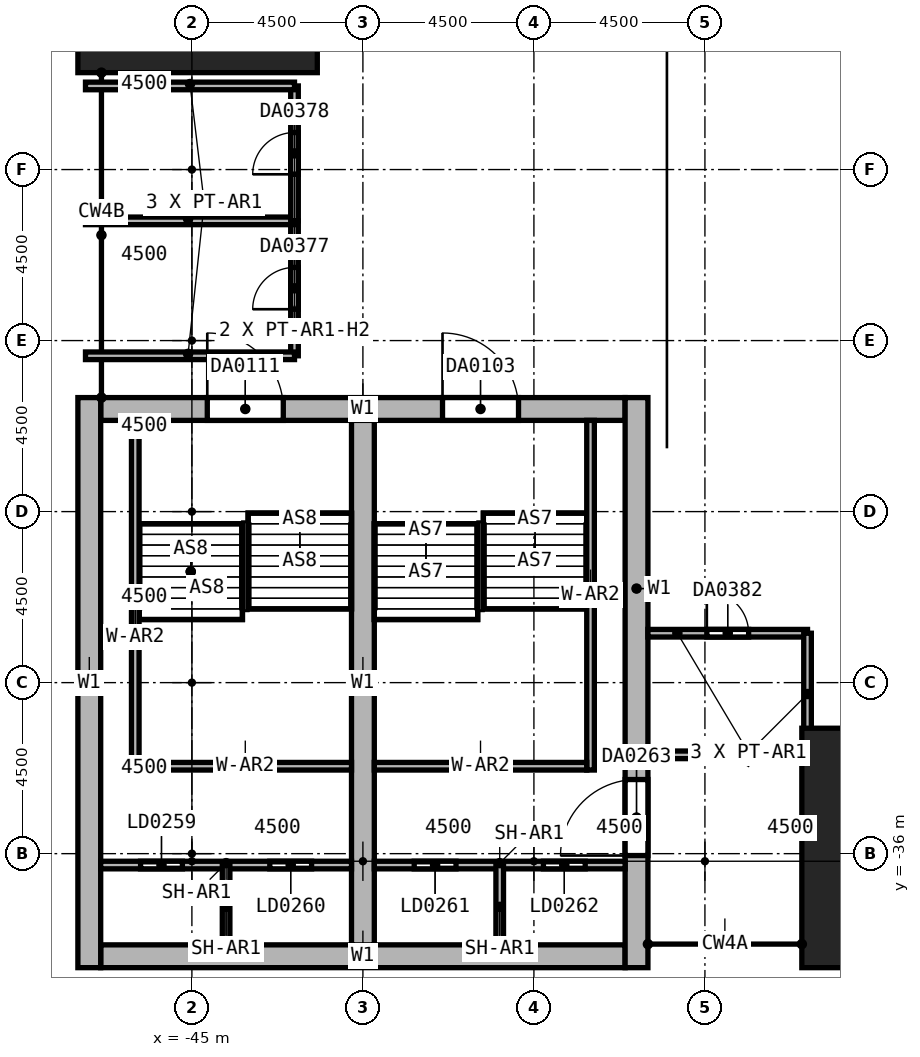
"""IFC4 building model, lengths in metres.
Left out: names, types, materials, properties, quantities, classifications, styles, units other than length and angle.
Written with IfcOpenShell. Run it as: python <this file> out.ifc"""

import sys

from ifc_helpers import new_model, si_unit, direction, frame, frame_2d, origin, origin_2d, place, context, subcontext, project, spatial, rectangle, extrude, element, fill, save


model = new_model("IFC4")
c1 = context("Model", 3, precision=1e-05, world=origin(), true_north=direction((0.0, 1.0)))
c2 = subcontext(c1, "Body", "Model", "MODEL_VIEW")
j1 = project(units=[si_unit("LENGTHUNIT", "METRE"), si_unit("PLANEANGLEUNIT", "RADIAN")], contexts=[c1])
p1 = place(None, origin())
s1 = spatial("IfcSite", under=j1, at=p1, CompositionType="ELEMENT")
p2 = place(p1, origin())
s2 = spatial("IfcBuilding", under=s1, at=p2, CompositionType="ELEMENT")
p3 = place(p2, frame((0.0, 0.0, 19.0)))
s3 = spatial("IfcBuildingStorey", under=s2, at=p3, CompositionType="ELEMENT", Elevation=19.0)
for number, where, z_axis, x_axis in (
    (1, (-27.0, -35.85, 0.0), (0.0, 0.0, 1.0), (1.0, 0.0, 0.0)),
    (2, (-44.85, -13.5, 0.0), (0.0, 0.0, 1.0), (0.0, 1.0, 0.0)),
):
    element("IfcColumn", number, at=place(p3, frame(where, z_axis=z_axis, x_axis=x_axis)), inside=s3, PredefinedType="COLUMN", context=c2, shape_type="SweptSolid", body=[
        extrude(rectangle(XDim=3.9, YDim=6.3, at=origin_2d()), origin(), (0.0, 0.0, 1.0), 6.0),
    ])
p4 = place(p3, frame((-47.4, -24.3, 0.0), z_axis=(0.0, 0.0, 1.0), x_axis=(1.0, 0.0, 0.0)))
e3 = element("IfcWall", 3, at=p4, inside=s3, PredefinedType="SHEAR", context=c2, shape_type="SweptSolid", body=[
    extrude(rectangle(XDim=13.8, YDim=0.6, at=frame_2d((6.9, 0.0))), origin(), (0.0, 0.0, 1.0), 6.0),
])
p5 = place(p4, frame((8.995, 0.0, 0.0)))
e4 = element("IfcOpeningElement", 4, at=p5, cuts=e3, PredefinedType="OPENING", context=c2, shape_type="SweptSolid", body=[
    extrude(rectangle(XDim=2.0, YDim=2.4, at=frame_2d((1.0, 1.2))), frame((0.0, 0.3, 0.0), z_axis=(0.0, -1.0, 0.0), x_axis=(1.0, 0.0, 0.0)), (0.0, 0.0, 1.0), 0.6),
])
p6 = place(p4, frame((2.805, 0.0, 0.0)))
e5 = element("IfcOpeningElement", 5, at=p6, cuts=e3, PredefinedType="OPENING", context=c2, shape_type="SweptSolid", body=[
    extrude(rectangle(XDim=2.0, YDim=2.4, at=frame_2d((1.0, 1.2))), frame((0.0, 0.3, 0.0), z_axis=(0.0, -1.0, 0.0), x_axis=(1.0, 0.0, 0.0)), (0.0, 0.0, 1.0), 0.6),
])
p7 = place(p3, frame((-47.4, -38.7, 0.0), z_axis=(0.0, 0.0, 1.0), x_axis=(1.0, 0.0, 0.0)))
e6 = element("IfcWall", 6, at=p7, inside=s3, PredefinedType="SHEAR", context=c2, shape_type="SweptSolid", body=[
    extrude(rectangle(XDim=13.8, YDim=0.6, at=frame_2d((6.9, 0.0))), origin(), (0.0, 0.0, 1.0), 6.0),
])
p8 = place(p3, frame((-47.7, -39.0, 0.0), z_axis=(0.0, 0.0, 1.0), x_axis=(0.0, 1.0, 0.0)))
e7 = element("IfcWall", 7, at=p8, inside=s3, PredefinedType="SHEAR", context=c2, shape_type="SweptSolid", body=[
    extrude(rectangle(XDim=15.0, YDim=0.6, at=frame_2d((7.5, 0.0))), origin(), (0.0, 0.0, 1.0), 6.0),
])
p9 = place(p3, frame((-33.3, -39.0, 0.0), z_axis=(0.0, 0.0, 1.0), x_axis=(0.0, 1.0, 0.0)))
e8 = element("IfcWall", 8, at=p9, inside=s3, PredefinedType="SHEAR", context=c2, shape_type="SweptSolid", body=[
    extrude(rectangle(XDim=15.0, YDim=0.6, at=frame_2d((7.5, 0.0))), origin(), (0.0, 0.0, 1.0), 6.0),
])
p10 = place(p9, frame((2.95, 0.0, 0.0)))
e9 = element("IfcOpeningElement", 9, at=p10, cuts=e8, PredefinedType="OPENING", context=c2, shape_type="SweptSolid", body=[
    extrude(rectangle(XDim=2.0, YDim=2.4, at=frame_2d((1.0, 1.2))), frame((0.0, 0.3, 0.0), z_axis=(0.0, -1.0, 0.0), x_axis=(1.0, 0.0, 0.0)), (0.0, 0.0, 1.0), 0.6),
])
p11 = place(p3, frame((-40.5, -38.4, 0.0), z_axis=(0.0, 0.0, 1.0), x_axis=(0.0, 1.0, 0.0)))
e10 = element("IfcWall", 10, at=p11, inside=s3, PredefinedType="SHEAR", context=c2, shape_type="SweptSolid", body=[
    extrude(rectangle(XDim=13.8, YDim=0.6, at=frame_2d((6.9, 0.0))), origin(), (0.0, 0.0, 1.0), 6.0),
])
p12 = place(p3, frame((-34.51, -33.8, 0.0), z_axis=(0.0, 0.0, 1.0), x_axis=(0.0, 1.0, 0.0)))
e11 = element("IfcWall", 11, at=p12, inside=s3, PredefinedType="SOLIDWALL", context=c2, shape_type="SweptSolid", body=[
    extrude(rectangle(XDim=9.2, YDim=0.2, at=frame_2d((4.6, 0.0))), origin(), (0.0, 0.0, 1.0), 6.0),
])
p13 = place(p3, frame((-40.2, -33.7, 0.0), z_axis=(0.0, 0.0, 1.0), x_axis=(1.0, 0.0, 0.0)))
e12 = element("IfcWall", 12, at=p13, inside=s3, PredefinedType="SOLIDWALL", context=c2, shape_type="SweptSolid", body=[
    extrude(rectangle(XDim=5.59, YDim=0.2, at=frame_2d((2.795, 0.0))), origin(), (0.0, 0.0, 1.0), 6.0),
])
p14 = place(p3, frame((-46.49, -33.8, 0.0), z_axis=(0.0, 0.0, 1.0), x_axis=(0.0, 1.0, 0.0)))
e13 = element("IfcWall", 13, at=p14, inside=s3, PredefinedType="SOLIDWALL", context=c2, shape_type="SweptSolid", body=[
    extrude(rectangle(XDim=9.2, YDim=0.2, at=frame_2d((4.6, 0.0))), origin(), (0.0, 0.0, 1.0), 6.0),
])
p15 = place(p3, frame((-46.39, -33.7, 0.0), z_axis=(0.0, 0.0, 1.0), x_axis=(1.0, 0.0, 0.0)))
e14 = element("IfcWall", 14, at=p15, inside=s3, PredefinedType="SOLIDWALL", context=c2, shape_type="SweptSolid", body=[
    extrude(rectangle(XDim=5.59, YDim=0.2, at=frame_2d((2.795, 0.0))), origin(), (0.0, 0.0, 1.0), 6.0),
])
p16 = place(p3, frame((-47.4, -36.3, 0.0), z_axis=(0.0, 0.0, 1.0), x_axis=(1.0, 0.0, 0.0)))
e15 = element("IfcWall", 15, at=p16, inside=s3, PredefinedType="SHEAR", context=c2, shape_type="SweptSolid", body=[
    extrude(rectangle(XDim=6.6, YDim=0.2, at=frame_2d((3.3, 0.0))), origin(), (0.0, 0.0, 1.0), 6.0),
])
p17 = place(p16, frame((1.05, 0.0, 0.0)))
e16 = element("IfcOpeningElement", 16, at=p17, cuts=e15, PredefinedType="OPENING", context=c2, shape_type="SweptSolid", body=[
    extrude(rectangle(XDim=1.1, YDim=2.4, at=frame_2d((0.55, 1.2))), frame((0.0, 0.1, 0.0), z_axis=(0.0, -1.0, 0.0), x_axis=(1.0, 0.0, 0.0)), (0.0, 0.0, 1.0), 0.2),
])
p18 = place(p16, frame((4.45, 0.0, 0.0)))
e17 = element("IfcOpeningElement", 17, at=p18, cuts=e15, PredefinedType="OPENING", context=c2, shape_type="SweptSolid", body=[
    extrude(rectangle(XDim=1.1, YDim=2.4, at=frame_2d((0.55, 1.2))), frame((0.0, 0.1, 0.0), z_axis=(0.0, -1.0, 0.0), x_axis=(1.0, 0.0, 0.0)), (0.0, 0.0, 1.0), 0.2),
])
p19 = place(p3, frame((-40.2, -36.3, 0.0), z_axis=(0.0, 0.0, 1.0), x_axis=(1.0, 0.0, 0.0)))
e18 = element("IfcWall", 18, at=p19, inside=s3, PredefinedType="SHEAR", context=c2, shape_type="SweptSolid", body=[
    extrude(rectangle(XDim=6.6, YDim=0.2, at=frame_2d((3.3, 0.0))), origin(), (0.0, 0.0, 1.0), 6.0),
])
p20 = place(p19, frame((1.05, 0.0, 0.0)))
e19 = element("IfcOpeningElement", 19, at=p20, cuts=e18, PredefinedType="OPENING", context=c2, shape_type="SweptSolid", body=[
    extrude(rectangle(XDim=1.1, YDim=2.4, at=frame_2d((0.55, 1.2))), frame((0.0, 0.1, 0.0), z_axis=(0.0, -1.0, 0.0), x_axis=(1.0, 0.0, 0.0)), (0.0, 0.0, 1.0), 0.2),
])
p21 = place(p19, frame((4.45, 0.0, 0.0)))
e20 = element("IfcOpeningElement", 20, at=p21, cuts=e18, PredefinedType="OPENING", context=c2, shape_type="SweptSolid", body=[
    extrude(rectangle(XDim=1.1, YDim=2.4, at=frame_2d((0.55, 1.2))), frame((0.0, 0.1, 0.0), z_axis=(0.0, -1.0, 0.0), x_axis=(1.0, 0.0, 0.0)), (0.0, 0.0, 1.0), 0.2),
])
for number, where, z_axis, x_axis in (
    (21, (-36.9, -38.4, 0.0), (0.0, 0.0, 1.0), (0.0, 1.0, 0.0)),
    (22, (-44.1, -38.4, 0.0), (0.0, 0.0, 1.0), (0.0, 1.0, 0.0)),
):
    element("IfcWall", number, at=place(p3, frame(where, z_axis=z_axis, x_axis=x_axis)), inside=s3, PredefinedType="SHEAR", context=c2, shape_type="SweptSolid", body=[
        extrude(rectangle(XDim=2.1, YDim=0.2, at=frame_2d((1.05, 0.0))), origin(), (0.0, 0.0, 1.0), 6.0),
    ])
p22 = place(p3, frame((-42.3, -22.9, 0.0), z_axis=(0.0, 0.0, 1.0), x_axis=(0.0, 1.0, 0.0)))
e23 = element("IfcWall", 23, at=p22, inside=s3, PredefinedType="PARTITIONING", context=c2, shape_type="SweptSolid", body=[
    extrude(rectangle(XDim=3.55, YDim=0.2, at=frame_2d((1.775, 0.0))), origin(), (0.0, 0.0, 1.0), 4.5),
])
p23 = place(p22, frame((1.225, 0.0, 0.0)))
e24 = element("IfcOpeningElement", 24, at=p23, cuts=e23, PredefinedType="OPENING", context=c2, shape_type="SweptSolid", body=[
    extrude(rectangle(XDim=1.1, YDim=2.4, at=frame_2d((0.55, 1.2))), frame((0.0, 0.1, 0.0), z_axis=(0.0, -1.0, 0.0), x_axis=(1.0, 0.0, 0.0)), (0.0, 0.0, 1.0), 0.2),
])
for number, where, z_axis, x_axis in (
    (25, (-42.3, -22.9, 0.0), (0.0, 0.0, 1.0), (-1.0, 0.0, 0.0)),
    (26, (-47.8, -19.35, 0.0), (0.0, 0.0, 1.0), (1.0, 0.0, 0.0)),
):
    element("IfcWall", number, at=place(p3, frame(where, z_axis=z_axis, x_axis=x_axis)), inside=s3, PredefinedType="PARTITIONING", context=c2, shape_type="SweptSolid", body=[
        extrude(rectangle(XDim=5.5, YDim=0.2, at=frame_2d((2.75, 0.0))), origin(), (0.0, 0.0, 1.0), 5.7),
    ])
p24 = place(p3, frame((-42.3, -19.35, 0.0), z_axis=(0.0, 0.0, 1.0), x_axis=(0.0, 1.0, 0.0)))
e27 = element("IfcWall", 27, at=p24, inside=s3, PredefinedType="PARTITIONING", context=c2, shape_type="SweptSolid", body=[
    extrude(rectangle(XDim=3.55, YDim=0.2, at=frame_2d((1.775, 0.0))), origin(), (0.0, 0.0, 1.0), 4.5),
])
p25 = place(p24, frame((1.225, 0.0, 0.0)))
e28 = element("IfcOpeningElement", 28, at=p25, cuts=e27, PredefinedType="OPENING", context=c2, shape_type="SweptSolid", body=[
    extrude(rectangle(XDim=1.1, YDim=2.4, at=frame_2d((0.55, 1.2))), frame((0.0, 0.1, 0.0), z_axis=(0.0, -1.0, 0.0), x_axis=(1.0, 0.0, 0.0)), (0.0, 0.0, 1.0), 0.2),
])
p26 = place(p3, frame((-42.3, -15.8, 0.0), z_axis=(0.0, 0.0, 1.0), x_axis=(-1.0, 0.0, 0.0)))
e29 = element("IfcWall", 29, at=p26, inside=s3, PredefinedType="PARTITIONING", context=c2, shape_type="SweptSolid", body=[
    extrude(rectangle(XDim=5.5, YDim=0.2, at=frame_2d((2.75, 0.0))), origin(), (0.0, 0.0, 1.0), 5.7),
])
p27 = place(p3, frame((-33.0, -30.2, 0.0), z_axis=(0.0, 0.0, 1.0), x_axis=(1.0, 0.0, 0.0)))
e30 = element("IfcWall", 30, at=p27, inside=s3, PredefinedType="PARTITIONING", context=c2, shape_type="SweptSolid", body=[
    extrude(rectangle(XDim=4.2, YDim=0.2, at=frame_2d((2.1, 0.0))), origin(), (0.0, 0.0, 1.0), 5.7),
])
p28 = place(p27, frame((1.55, 0.0, 0.0)))
e31 = element("IfcOpeningElement", 31, at=p28, cuts=e30, PredefinedType="OPENING", context=c2, shape_type="SweptSolid", body=[
    extrude(rectangle(XDim=1.1, YDim=2.4, at=frame_2d((0.55, 1.2))), frame((0.0, 0.1, 0.0), z_axis=(0.0, -1.0, 0.0), x_axis=(1.0, 0.0, 0.0)), (0.0, 0.0, 1.0), 0.2),
])
p29 = place(p3, frame((-28.8, -33.4, 0.0), z_axis=(0.0, 0.0, 1.0), x_axis=(0.0, 1.0, 0.0)))
e32 = element("IfcWall", 32, at=p29, inside=s3, PredefinedType="PARTITIONING", context=c2, shape_type="SweptSolid", body=[
    extrude(rectangle(XDim=3.2, YDim=0.2, at=frame_2d((1.6, 0.0))), origin(), (0.0, 0.0, 1.0), 5.7),
])
p30 = place(p3, frame((-33.0, -33.4, 0.0), z_axis=(0.0, 0.0, 1.0), x_axis=(1.0, 0.0, 0.0)))
e33 = element("IfcWall", 33, at=p30, inside=s3, PredefinedType="PARTITIONING", context=c2, shape_type="SweptSolid", body=[
    extrude(rectangle(XDim=4.2, YDim=0.2, at=frame_2d((2.1, 0.0))), origin(), (0.0, 0.0, 1.0), 5.7),
])
p31 = place(p5, frame((2.0, 0.0, 0.0), z_axis=(0.0, 0.0, 1.0), x_axis=(-1.0, 0.0, 0.0)))
e34 = element("IfcDoor", 34, at=p31, inside=s3, OperationType="DOUBLE_DOOR_SINGLE_SWING", PredefinedType="DOOR", context=c2, shape_type="SweptSolid", body=[
    extrude(rectangle(XDim=2.0, YDim=2.4, at=frame_2d((1.0, 1.2))), frame((0.0, 0.025, 0.0), z_axis=(0.0, -1.0, 0.0), x_axis=(1.0, 0.0, 0.0)), (0.0, 0.0, 1.0), 0.05),
])
fill(e4, e34)
p32 = place(p6, frame((2.0, 0.0, 0.0), z_axis=(0.0, 0.0, 1.0), x_axis=(-1.0, 0.0, 0.0)))
e35 = element("IfcDoor", 35, at=p32, inside=s3, OperationType="DOUBLE_DOOR_SINGLE_SWING", PredefinedType="DOOR", context=c2, shape_type="SweptSolid", body=[
    extrude(rectangle(XDim=2.0, YDim=2.4, at=frame_2d((1.0, 1.2))), frame((0.0, 0.025, 0.0), z_axis=(0.0, -1.0, 0.0), x_axis=(1.0, 0.0, 0.0)), (0.0, 0.0, 1.0), 0.05),
])
fill(e5, e35)
p33 = place(p17, frame((1.1, 0.0, 0.0), z_axis=(0.0, 0.0, 1.0), x_axis=(-1.0, 0.0, 0.0)))
e36 = element("IfcDoor", 36, at=p33, inside=s3, OperationType="DOUBLE_DOOR_SLIDING", PredefinedType="DOOR", context=c2, shape_type="SweptSolid", body=[
    extrude(rectangle(XDim=1.1, YDim=2.4, at=frame_2d((0.55, 1.2))), frame((0.0, 0.025, 0.0), z_axis=(0.0, -1.0, 0.0), x_axis=(1.0, 0.0, 0.0)), (0.0, 0.0, 1.0), 0.05),
])
fill(e16, e36)
p34 = place(p18, frame((1.1, 0.0, 0.0), z_axis=(0.0, 0.0, 1.0), x_axis=(-1.0, 0.0, 0.0)))
e37 = element("IfcDoor", 37, at=p34, inside=s3, OperationType="DOUBLE_DOOR_SLIDING", PredefinedType="DOOR", context=c2, shape_type="SweptSolid", body=[
    extrude(rectangle(XDim=1.1, YDim=2.4, at=frame_2d((0.55, 1.2))), frame((0.0, 0.025, 0.0), z_axis=(0.0, -1.0, 0.0), x_axis=(1.0, 0.0, 0.0)), (0.0, 0.0, 1.0), 0.05),
])
fill(e17, e37)
p35 = place(p20, frame((1.1, 0.0, 0.0), z_axis=(0.0, 0.0, 1.0), x_axis=(-1.0, 0.0, 0.0)))
e38 = element("IfcDoor", 38, at=p35, inside=s3, OperationType="DOUBLE_DOOR_SLIDING", PredefinedType="DOOR", context=c2, shape_type="SweptSolid", body=[
    extrude(rectangle(XDim=1.1, YDim=2.4, at=frame_2d((0.55, 1.2))), frame((0.0, 0.025, 0.0), z_axis=(0.0, -1.0, 0.0), x_axis=(1.0, 0.0, 0.0)), (0.0, 0.0, 1.0), 0.05),
])
fill(e19, e38)
p36 = place(p21, frame((1.1, 0.0, 0.0), z_axis=(0.0, 0.0, 1.0), x_axis=(-1.0, 0.0, 0.0)))
e39 = element("IfcDoor", 39, at=p36, inside=s3, OperationType="DOUBLE_DOOR_SLIDING", PredefinedType="DOOR", context=c2, shape_type="SweptSolid", body=[
    extrude(rectangle(XDim=1.1, YDim=2.4, at=frame_2d((0.55, 1.2))), frame((0.0, 0.025, 0.0), z_axis=(0.0, -1.0, 0.0), x_axis=(1.0, 0.0, 0.0)), (0.0, 0.0, 1.0), 0.05),
])
fill(e20, e39)
p37 = place(p10, origin())
e40 = element("IfcDoor", 40, at=p37, inside=s3, OperationType="DOUBLE_DOOR_SINGLE_SWING", PredefinedType="DOOR", context=c2, shape_type="SweptSolid", body=[
    extrude(rectangle(XDim=2.0, YDim=2.4, at=frame_2d((1.0, 1.2))), frame((0.0, 0.025, 0.0), z_axis=(0.0, -1.0, 0.0), x_axis=(1.0, 0.0, 0.0)), (0.0, 0.0, 1.0), 0.05),
])
fill(e9, e40)
p38 = place(p23, origin())
e41 = element("IfcDoor", 41, at=p38, inside=s3, OperationType="DOUBLE_DOOR_SINGLE_SWING", PredefinedType="DOOR", context=c2, shape_type="SweptSolid", body=[
    extrude(rectangle(XDim=1.1, YDim=2.4, at=frame_2d((0.55, 1.2))), frame((0.0, 0.025, 0.0), z_axis=(0.0, -1.0, 0.0), x_axis=(1.0, 0.0, 0.0)), (0.0, 0.0, 1.0), 0.05),
])
fill(e24, e41)
p39 = place(p25, origin())
e42 = element("IfcDoor", 42, at=p39, inside=s3, OperationType="DOUBLE_DOOR_SINGLE_SWING", PredefinedType="DOOR", context=c2, shape_type="SweptSolid", body=[
    extrude(rectangle(XDim=1.1, YDim=2.4, at=frame_2d((0.55, 1.2))), frame((0.0, 0.025, 0.0), z_axis=(0.0, -1.0, 0.0), x_axis=(1.0, 0.0, 0.0)), (0.0, 0.0, 1.0), 0.05),
])
fill(e28, e42)
p40 = place(p28, origin())
e43 = element("IfcDoor", 43, at=p40, inside=s3, OperationType="DOUBLE_DOOR_SINGLE_SWING", PredefinedType="DOOR", context=c2, shape_type="SweptSolid", body=[
    extrude(rectangle(XDim=1.1, YDim=2.4, at=frame_2d((0.55, 1.2))), frame((0.0, 0.025, 0.0), z_axis=(0.0, -1.0, 0.0), x_axis=(1.0, 0.0, 0.0)), (0.0, 0.0, 1.0), 0.05),
])
fill(e31, e43)
save(model, sys.argv[1])
